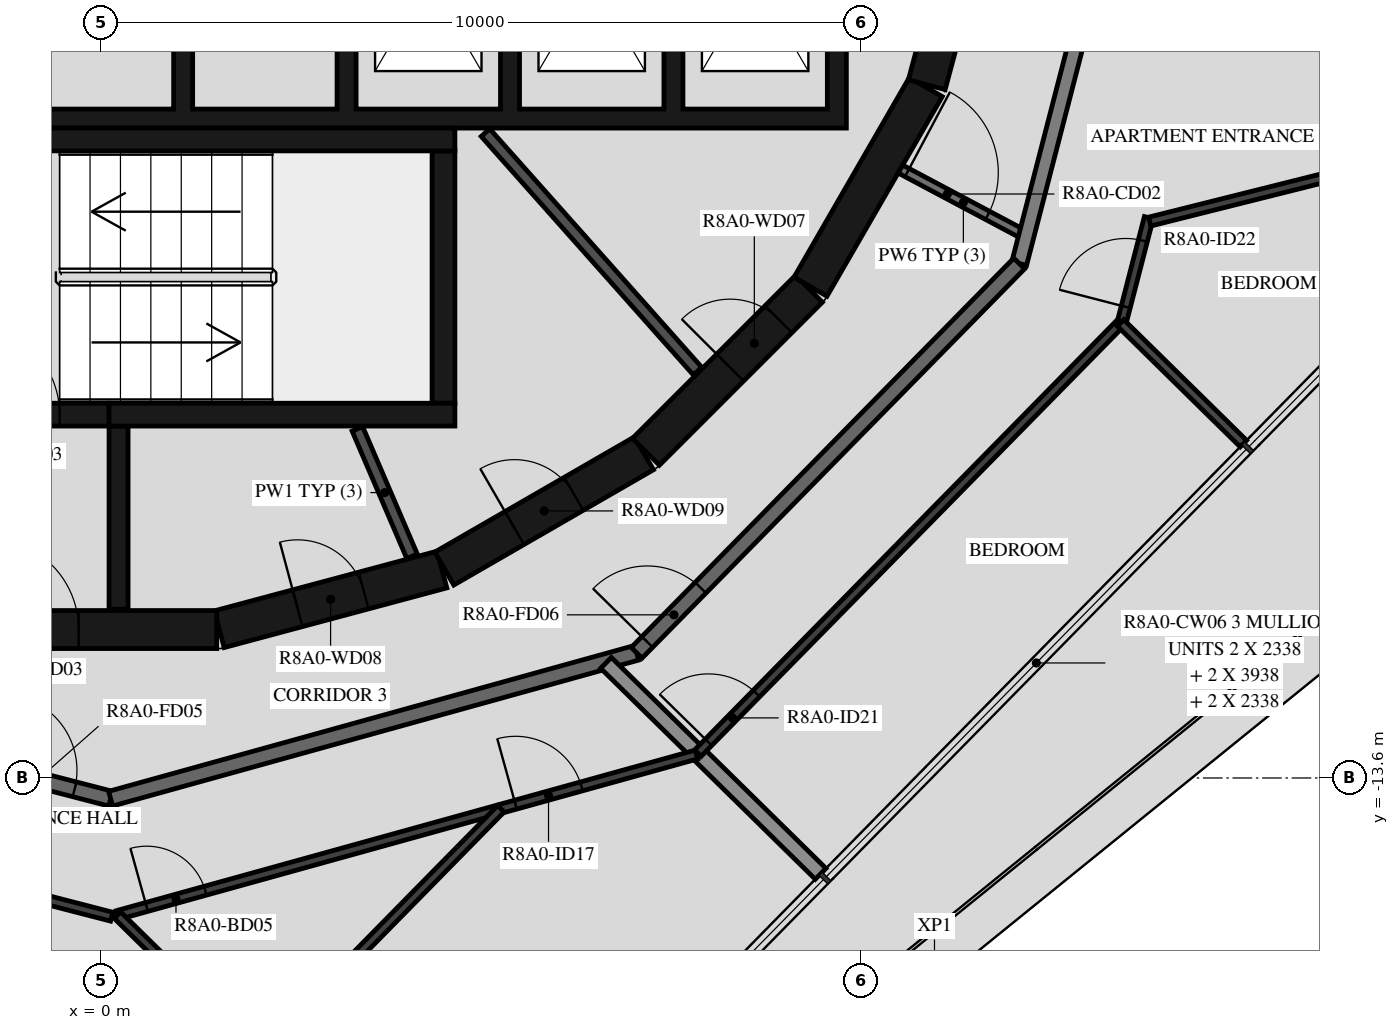
"""IFC4 building model, lengths in metres.
Left out: names, types, materials, properties, quantities, classifications, styles, units other than length and angle.
Written with IfcOpenShell. Run it as: python <this file> out.ifc"""

import sys

from ifc_helpers import new_model, si_unit, direction, frame, frame_2d, origin, place, context, subcontext, project, spatial, polyline, rectangle, outline, extrude, element, fill, save


model = new_model("IFC4")
c1 = context("Model", 3, precision=1e-05, world=origin(), true_north=direction((0.0, 1.0)))
c2 = subcontext(c1, "Body", "Model", "MODEL_VIEW")
j1 = project(units=[si_unit("LENGTHUNIT", "METRE"), si_unit("PLANEANGLEUNIT", "RADIAN")], contexts=[c1])
p1 = place(None, origin())
s1 = spatial("IfcSite", under=j1, at=p1, CompositionType="ELEMENT")
p2 = place(p1, origin())
s2 = spatial("IfcBuilding", under=s1, at=p2, CompositionType="ELEMENT")
p3 = place(p2, frame((0.0, 0.0, 298.2)))
s3 = spatial("IfcBuildingStorey", under=s2, at=p3, CompositionType="ELEMENT", Elevation=298.2)
p4 = place(p3, frame((1.55, -11.643, 0.0), z_axis=(0.0, 0.0, 1.0), x_axis=(0.965948410781, 0.258734743916, 0.0)))
e1 = element("IfcWall", 1, at=p4, inside=s3, PredefinedType="SHEAR", context=c2, shape_type="SweptSolid", body=[
    extrude(rectangle(XDim=3.033, YDim=0.5, at=frame_2d((1.516, 0.0))), origin(), (0.0, 0.0, 1.0), 3.12),
])
p5 = place(p4, frame((1.066, 0.0, 0.0)))
e2 = element("IfcOpeningElement", 2, at=p5, cuts=e1, PredefinedType="OPENING", context=c2, shape_type="SweptSolid", body=[
    extrude(rectangle(XDim=0.9, YDim=2.1, at=frame_2d((0.45, 1.05))), frame((0.0, 0.26, 0.0), z_axis=(0.0, -1.0, 0.0), x_axis=(1.0, 0.0, 0.0)), (0.0, 0.0, 1.0), 0.52),
])
p6 = place(p3, frame((4.51, -10.845, 0.0), z_axis=(0.0, 0.0, 1.0), x_axis=(0.865975092491, 0.500087131594, 0.0)))
e3 = element("IfcWall", 3, at=p6, inside=s3, PredefinedType="SHEAR", context=c2, shape_type="SweptSolid", body=[
    extrude(rectangle(XDim=3.033, YDim=0.5, at=frame_2d((1.516, 0.0))), origin(), (0.0, 0.0, 1.0), 3.12),
])
p7 = place(p6, frame((1.066, 0.0, 0.0)))
e4 = element("IfcOpeningElement", 4, at=p7, cuts=e3, PredefinedType="OPENING", context=c2, shape_type="SweptSolid", body=[
    extrude(rectangle(XDim=0.9, YDim=2.1, at=frame_2d((0.45, 1.05))), frame((0.0, 0.26, 0.0), z_axis=(0.0, -1.0, 0.0), x_axis=(1.0, 0.0, 0.0)), (0.0, 0.0, 1.0), 0.52),
])
p8 = place(p3, frame((7.164, -9.308, 0.0), z_axis=(0.0, 0.0, 1.0), x_axis=(0.707106781187, 0.707106781187, 0.0)))
e5 = element("IfcWall", 5, at=p8, inside=s3, PredefinedType="SHEAR", context=c2, shape_type="SweptSolid", body=[
    extrude(rectangle(XDim=3.032, YDim=0.5, at=frame_2d((1.516, 0.0))), origin(), (0.0, 0.0, 1.0), 3.12),
])
p9 = place(p8, frame((1.566, 0.0, 0.0)))
e6 = element("IfcOpeningElement", 6, at=p9, cuts=e5, PredefinedType="OPENING", context=c2, shape_type="SweptSolid", body=[
    extrude(rectangle(XDim=0.9, YDim=2.1, at=frame_2d((0.45, 1.05))), frame((0.0, 0.26, 0.0), z_axis=(0.0, -1.0, 0.0), x_axis=(1.0, 0.0, 0.0)), (0.0, 0.0, 1.0), 0.52),
])
for number, where, z_axis, x_axis in (
    (7, (9.329, -7.137, 0.0), (0.0, 0.0, 1.0), (0.5, 0.866, 0.0)),
    (8, (10.858, -4.479, 0.0), (0.0, 0.0, 1.0), (0.259, 0.966, 0.0)),
):
    element("IfcWall", number, at=place(p3, frame(where, z_axis=z_axis, x_axis=x_axis)), inside=s3, PredefinedType="SHEAR", context=c2, shape_type="SweptSolid", body=[
        extrude(rectangle(XDim=3.033, YDim=0.5, at=frame_2d((1.516, 0.0))), origin(), (0.0, 0.0, 1.0), 3.12),
    ])
p10 = place(p3, frame((-1.516, -11.647, 0.0), z_axis=(0.0, 0.0, 1.0), x_axis=(1.0, 0.0, 0.0)))
e9 = element("IfcWall", 9, at=p10, inside=s3, PredefinedType="SHEAR", context=c2, shape_type="SweptSolid", body=[
    extrude(rectangle(XDim=3.033, YDim=0.5, at=frame_2d((1.516, 0.0))), origin(), (0.0, 0.0, 1.0), 3.12),
])
p11 = place(p10, frame((0.016, 0.0, 0.0)))
e10 = element("IfcOpeningElement", 10, at=p11, cuts=e9, PredefinedType="OPENING", context=c2, shape_type="SweptSolid", body=[
    extrude(rectangle(XDim=1.2, YDim=2.1, at=frame_2d((0.6, 1.05))), frame((0.0, 0.26, 0.0), z_axis=(0.0, -1.0, 0.0), x_axis=(1.0, 0.0, 0.0)), (0.0, 0.0, 1.0), 0.52),
])
p12 = place(p3, frame((-2.4, -5.2, 0.0), z_axis=(0.0, 0.0, 1.0), x_axis=(1.0, 0.0, 0.0)))
e11 = element("IfcWall", 11, at=p12, inside=s3, PredefinedType="SHEAR", context=c2, shape_type="SweptSolid", body=[
    extrude(rectangle(XDim=7.05, YDim=0.3, at=frame_2d((3.525, 0.0))), origin(), (0.0, 0.0, 1.0), 3.12),
])
p13 = place(p3, frame((4.5, -8.67, 0.0), z_axis=(0.0, 0.0, 1.0), x_axis=(0.0, 1.0, 0.0)))
e12 = element("IfcWall", 12, at=p13, inside=s3, PredefinedType="SHEAR", context=c2, shape_type="SweptSolid", body=[
    extrude(rectangle(XDim=3.32, YDim=0.3, at=frame_2d((1.66, 0.0))), origin(), (0.0, 0.0, 1.0), 3.12),
])
p14 = place(p3, frame((0.1, -8.82, 0.0), z_axis=(0.0, 0.0, 1.0), x_axis=(1.0, 0.0, 0.0)))
e13 = element("IfcWall", 13, at=p14, inside=s3, PredefinedType="SHEAR", context=c2, shape_type="SweptSolid", body=[
    extrude(rectangle(XDim=4.55, YDim=0.3, at=frame_2d((2.275, 0.0))), origin(), (0.0, 0.0, 1.0), 3.12),
])
p15 = place(p3, frame((-2.4, -8.82, 0.0), z_axis=(0.0, 0.0, 1.0), x_axis=(1.0, 0.0, 0.0)))
e14 = element("IfcWall", 14, at=p15, inside=s3, PredefinedType="SHEAR", context=c2, shape_type="SweptSolid", body=[
    extrude(rectangle(XDim=2.5, YDim=0.3, at=frame_2d((1.25, 0.0))), origin(), (0.0, 0.0, 1.0), 3.12),
])
p16 = place(p15, frame((0.65, 0.0, 0.0)))
e15 = element("IfcOpeningElement", 15, at=p16, cuts=e14, PredefinedType="OPENING", context=c2, shape_type="SweptSolid", body=[
    extrude(rectangle(XDim=1.2, YDim=2.1, at=frame_2d((0.6, 1.05))), frame((0.0, 0.16, 0.0), z_axis=(0.0, -1.0, 0.0), x_axis=(1.0, 0.0, 0.0)), (0.0, 0.0, 1.0), 0.32),
])
p17 = place(p3, frame((0.225, -8.97, 0.0), z_axis=(0.0, 0.0, 1.0), x_axis=(0.0, -1.0, 0.0)))
e16 = element("IfcWall", 16, at=p17, inside=s3, PredefinedType="SHEAR", context=c2, shape_type="SweptSolid", body=[
    extrude(rectangle(XDim=2.41, YDim=0.25, at=frame_2d((1.205, 0.0))), origin(), (0.0, 0.0, 1.0), 3.12),
])
p18 = place(p3, origin())
e17 = element("IfcWall", 17, at=p18, inside=s3, PredefinedType="SHEAR", context=c2, shape_type="SweptSolid", body=[
    extrude(outline(polyline([(9.8, -5.05), (9.8, -4.8), (9.8, -1.9), (9.55, -1.9), (9.55, -4.8), (7.65, -4.8), (7.65, -1.9), (7.4, -1.9), (7.4, -4.8), (5.5, -4.8), (5.5, -1.9), (5.25, -1.9), (5.25, -4.8), (3.35, -4.8), (3.35, -1.9), (3.1, -1.9), (3.1, -4.8), (1.2, -4.8), (1.2, -1.9), (0.95, -1.9), (0.95, -4.8), (-0.95, -4.8), (-0.95, -1.9), (-1.2, -1.9), (-1.2, -4.8), (-3.1, -4.8), (-3.1, -1.9), (-3.35, -1.9), (-3.35, -4.8), (-5.25, -4.8), (-5.25, -1.9), (-5.5, -1.9), (-5.5, -4.8), (-9.55, -4.8), (-9.55, -1.9), (-9.8, -1.9), (-9.8, -4.8), (-9.8, -5.05), (9.8, -5.05)])), origin(), (0.0, 0.0, 1.0), 3.12),
])
p19 = place(p3, frame((7.842, -8.248, 0.0), z_axis=(0.0, 0.0, 1.0), x_axis=(-0.66446128181, 0.747322691329, 0.0)))
e18 = element("IfcWall", 18, at=p19, inside=s3, PredefinedType="PARTITIONING", context=c2, shape_type="SweptSolid", body=[
    extrude(rectangle(XDim=4.198, YDim=0.15, at=frame_2d((2.099, 0.0))), origin(), (0.0, 0.0, 1.0), 3.12),
])
p20 = place(p3, frame((3.367, -9.007, 0.0), z_axis=(0.0, 0.0, 1.0), x_axis=(0.394387482265, -0.918944238696, 0.0)))
e19 = element("IfcWall", 19, at=p20, inside=s3, PredefinedType="PARTITIONING", context=c2, shape_type="SweptSolid", body=[
    extrude(rectangle(XDim=1.825, YDim=0.15, at=frame_2d((0.913, 0.0))), origin(), (0.0, 0.0, 1.0), 3.12),
])
p21 = place(p3, frame((10.511, -5.589, 0.0), z_axis=(0.0, 0.0, 1.0), x_axis=(0.882957311919, -0.469453283437, 0.0)))
e20 = element("IfcWall", 20, at=p21, inside=s3, PredefinedType="PARTITIONING", context=c2, shape_type="SweptSolid", body=[
    extrude(rectangle(XDim=1.876, YDim=0.12, at=frame_2d((0.938, 0.0))), origin(), (0.0, 0.0, 1.0), 3.12),
])
p22 = place(p21, frame((0.1, 0.0, 0.0)))
e21 = element("IfcOpeningElement", 21, at=p22, cuts=e20, PredefinedType="OPENING", context=c2, shape_type="SweptSolid", body=[
    extrude(rectangle(XDim=1.2, YDim=2.1, at=frame_2d((0.6, 1.05))), frame((0.0, 0.07, 0.0), z_axis=(0.0, -1.0, 0.0), x_axis=(1.0, 0.0, 0.0)), (0.0, 0.0, 1.0), 0.14),
])
p23 = place(p3, frame((12.074, -6.831, 0.0), z_axis=(0.0, 0.0, 1.0), x_axis=(0.250391063186, 0.968144780225, 0.0)))
e22 = element("IfcWall", 22, at=p23, inside=s3, PredefinedType="STANDARD", context=c2, shape_type="SweptSolid", body=[
    extrude(rectangle(XDim=7.181, YDim=0.2, at=frame_2d((3.591, 0.0))), origin(), (0.0, 0.0, 1.0), 3.12),
])
p24 = place(p23, frame((3.581, 0.0, 0.0)))
e23 = element("IfcOpeningElement", 23, at=p24, cuts=e22, PredefinedType="OPENING", context=c2, shape_type="SweptSolid", body=[
    extrude(rectangle(XDim=1.8, YDim=2.1, at=frame_2d((0.9, 1.05))), frame((0.0, 0.11, 0.0), z_axis=(0.0, -1.0, 0.0), x_axis=(1.0, 0.0, 0.0)), (0.0, 0.0, 1.0), 0.22),
])
p25 = place(p3, frame((-6.831, -12.074, 0.0), z_axis=(0.0, 0.0, 1.0), x_axis=(0.968144780225, -0.250391063186, 0.0)))
e24 = element("IfcWall", 24, at=p25, inside=s3, PredefinedType="STANDARD", context=c2, shape_type="SweptSolid", body=[
    extrude(rectangle(XDim=7.181, YDim=0.2, at=frame_2d((3.591, 0.0))), origin(), (0.0, 0.0, 1.0), 3.12),
])
p26 = place(p25, frame((2.39, 0.0, 0.0)))
e25 = element("IfcOpeningElement", 25, at=p26, cuts=e24, PredefinedType="OPENING", context=c2, shape_type="SweptSolid", body=[
    extrude(rectangle(XDim=1.0, YDim=2.1, at=frame_2d((0.5, 1.05))), frame((0.0, 0.11, 0.0), z_axis=(0.0, -1.0, 0.0), x_axis=(1.0, 0.0, 0.0)), (0.0, 0.0, 1.0), 0.22),
])
p27 = place(p25, frame((5.69, 0.0, 0.0)))
e26 = element("IfcOpeningElement", 26, at=p27, cuts=e24, PredefinedType="OPENING", context=c2, shape_type="SweptSolid", body=[
    extrude(rectangle(XDim=1.0, YDim=2.1, at=frame_2d((0.5, 1.05))), frame((0.0, 0.11, 0.0), z_axis=(0.0, -1.0, 0.0), x_axis=(1.0, 0.0, 0.0)), (0.0, 0.0, 1.0), 0.22),
])
p28 = place(p3, frame((0.121, -13.872, 0.0), z_axis=(0.0, 0.0, 1.0), x_axis=(0.963625960674, 0.267254575108, 0.0)))
e27 = element("IfcWall", 27, at=p28, inside=s3, PredefinedType="STANDARD", context=c2, shape_type="SweptSolid", body=[
    extrude(rectangle(XDim=7.181, YDim=0.2, at=frame_2d((3.591, 0.0))), origin(), (0.0, 0.0, 1.0), 3.12),
])
p29 = place(p3, frame((7.041, -11.953, 0.0), z_axis=(0.0, 0.0, 1.0), x_axis=(0.70090916255, 0.713250549143, 0.0)))
e28 = element("IfcWall", 28, at=p29, inside=s3, PredefinedType="STANDARD", context=c2, shape_type="SweptSolid", body=[
    extrude(rectangle(XDim=7.181, YDim=0.2, at=frame_2d((3.59, 0.0))), origin(), (0.0, 0.0, 1.0), 3.12),
])
p30 = place(p29, frame((0.2, 0.0, 0.0)))
e29 = element("IfcOpeningElement", 29, at=p30, cuts=e28, PredefinedType="OPENING", context=c2, shape_type="SweptSolid", body=[
    extrude(rectangle(XDim=1.0, YDim=2.1, at=frame_2d((0.5, 1.05))), frame((0.0, 0.11, 0.0), z_axis=(0.0, -1.0, 0.0), x_axis=(1.0, 0.0, 0.0)), (0.0, 0.0, 1.0), 0.22),
])
p31 = place(p3, frame((9.462, -14.861, 0.0), z_axis=(0.0, 0.0, 1.0), x_axis=(-0.713276937124, 0.700882308927, 0.0)))
e30 = element("IfcWall", 30, at=p31, inside=s3, PredefinedType="STANDARD", context=c2, shape_type="SweptSolid", body=[
    extrude(rectangle(XDim=3.959, YDim=0.2, at=frame_2d((1.979, 0.0))), origin(), (0.0, 0.0, 1.0), 2.73),
])
p32 = place(p3, frame((-2.427, -14.763, 0.0), z_axis=(0.0, 0.0, 1.0), x_axis=(0.968151154118, -0.250366417036, 0.0)))
e31 = element("IfcWall", 31, at=p32, inside=s3, PredefinedType="PARTITIONING", context=c2, shape_type="SweptSolid", body=[
    extrude(rectangle(XDim=2.646, YDim=0.12, at=frame_2d((1.323, 0.0))), origin(), (0.0, 0.0, 1.0), 3.12),
])
p33 = place(p3, frame((0.21, -15.404, 0.0), z_axis=(0.0, 0.0, 1.0), x_axis=(0.963630625717, 0.267237754032, 0.0)))
e32 = element("IfcWall", 32, at=p33, inside=s3, PredefinedType="PARTITIONING", context=c2, shape_type="SweptSolid", body=[
    extrude(rectangle(XDim=7.907, YDim=0.12, at=frame_2d((3.954, 0.0))), origin(), (0.0, 0.0, 1.0), 3.12),
])
p34 = place(p33, frame((0.4, 0.0, 0.0)))
e33 = element("IfcOpeningElement", 33, at=p34, cuts=e32, PredefinedType="OPENING", context=c2, shape_type="SweptSolid", body=[
    extrude(rectangle(XDim=0.8, YDim=2.1, at=frame_2d((0.4, 1.05))), frame((0.0, 0.07, 0.0), z_axis=(0.0, -1.0, 0.0), x_axis=(1.0, 0.0, 0.0)), (0.0, 0.0, 1.0), 0.14),
])
p35 = place(p33, frame((5.436, 0.0, 0.0)))
e34 = element("IfcOpeningElement", 34, at=p35, cuts=e32, PredefinedType="OPENING", context=c2, shape_type="SweptSolid", body=[
    extrude(rectangle(XDim=0.9, YDim=2.1, at=frame_2d((0.45, 1.05))), frame((0.0, 0.07, 0.0), z_axis=(0.0, -1.0, 0.0), x_axis=(1.0, 0.0, 0.0)), (0.0, 0.0, 1.0), 0.14),
])
p36 = place(p3, frame((-1.304, -20.68, 0.0), z_axis=(0.0, 0.0, 1.0), x_axis=(0.700896976526, 0.713262524108, 0.0)))
e35 = element("IfcWall", 35, at=p36, inside=s3, PredefinedType="PARTITIONING", context=c2, shape_type="SweptSolid", body=[
    extrude(rectangle(XDim=9.358, YDim=0.12, at=frame_2d((4.679, 0.0))), origin(), (0.0, 0.0, 1.0), 3.12),
])
p37 = place(p36, frame((0.849, 0.0, 0.0)))
e36 = element("IfcOpeningElement", 36, at=p37, cuts=e35, PredefinedType="OPENING", context=c2, shape_type="SweptSolid", body=[
    extrude(rectangle(XDim=0.9, YDim=2.1, at=frame_2d((0.45, 1.05))), frame((0.0, 0.07, 0.0), z_axis=(0.0, -1.0, 0.0), x_axis=(1.0, 0.0, 0.0)), (0.0, 0.0, 1.0), 0.14),
])
p38 = place(p3, frame((2.077, -17.239, 0.0), z_axis=(0.0, 0.0, 1.0), x_axis=(-0.713235001716, 0.700924983381, 0.0)))
e37 = element("IfcWall", 37, at=p38, inside=s3, PredefinedType="PARTITIONING", context=c2, shape_type="SweptSolid", body=[
    extrude(rectangle(XDim=2.618, YDim=0.12, at=frame_2d((1.309, 0.0))), origin(), (0.0, 0.0, 1.0), 3.12),
])
p39 = place(p3, frame((7.846, -13.273, 0.0), z_axis=(0.0, 0.0, 1.0), x_axis=(0.700911018066, 0.713248725728, 0.0)))
e38 = element("IfcWall", 38, at=p39, inside=s3, PredefinedType="PARTITIONING", context=c2, shape_type="SweptSolid", body=[
    extrude(rectangle(XDim=7.935, YDim=0.12, at=frame_2d((3.968, 0.0))), origin(), (0.0, 0.0, 1.0), 3.12),
])
p40 = place(p39, frame((0.2, 0.0, 0.0)))
e39 = element("IfcOpeningElement", 39, at=p40, cuts=e38, PredefinedType="OPENING", context=c2, shape_type="SweptSolid", body=[
    extrude(rectangle(XDim=0.9, YDim=2.1, at=frame_2d((0.45, 1.05))), frame((0.0, 0.07, 0.0), z_axis=(0.0, -1.0, 0.0), x_axis=(1.0, 0.0, 0.0)), (0.0, 0.0, 1.0), 0.14),
])
p41 = place(p3, frame((13.426, -7.596, 0.0), z_axis=(0.0, 0.0, 1.0), x_axis=(0.250380027586, 0.968147634292, 0.0)))
e40 = element("IfcWall", 40, at=p41, inside=s3, PredefinedType="PARTITIONING", context=c2, shape_type="SweptSolid", body=[
    extrude(rectangle(XDim=1.412, YDim=0.12, at=frame_2d((0.706, 0.0))), origin(), (0.0, 0.0, 1.0), 3.12),
])
p42 = place(p41, frame((0.2, 0.0, 0.0)))
e41 = element("IfcOpeningElement", 41, at=p42, cuts=e40, PredefinedType="OPENING", context=c2, shape_type="SweptSolid", body=[
    extrude(rectangle(XDim=0.9, YDim=2.1, at=frame_2d((0.45, 1.05))), frame((0.0, 0.07, 0.0), z_axis=(0.0, -1.0, 0.0), x_axis=(1.0, 0.0, 0.0)), (0.0, 0.0, 1.0), 0.14),
])
p43 = place(p3, frame((13.792, -6.28, 0.0), z_axis=(0.0, 0.0, 1.0), x_axis=(0.970009253073, 0.243067992449, 0.0)))
e42 = element("IfcWall", 42, at=p43, inside=s3, PredefinedType="PARTITIONING", context=c2, shape_type="SweptSolid", body=[
    extrude(rectangle(XDim=5.611, YDim=0.12, at=frame_2d((2.805, 0.0))), origin(), (0.0, 0.0, 1.0), 3.12),
])
p44 = place(p3, frame((15.024, -9.201, 0.0), z_axis=(0.0, 0.0, 1.0), x_axis=(-0.713331704042, 0.700826569137, 0.0)))
e43 = element("IfcWall", 43, at=p44, inside=s3, PredefinedType="PARTITIONING", context=c2, shape_type="SweptSolid", body=[
    extrude(rectangle(XDim=2.265, YDim=0.12, at=frame_2d((1.132, 0.0))), origin(), (0.0, 0.0, 1.0), 2.73),
])
p45 = place(p16, origin())
e44 = element("IfcDoor", 44, at=p45, inside=s3, OperationType="SINGLE_SWING_LEFT", PredefinedType="DOOR", context=c2, shape_type="SweptSolid", body=[
    extrude(rectangle(XDim=1.2, YDim=2.1, at=frame_2d((0.6, 1.05))), frame((0.0, 0.025, 0.0), z_axis=(0.0, -1.0, 0.0), x_axis=(1.0, 0.0, 0.0)), (0.0, 0.0, 1.0), 0.05),
])
fill(e15, e44)
p46 = place(p11, origin())
e45 = element("IfcDoor", 45, at=p46, inside=s3, OperationType="SINGLE_SWING_RIGHT", PredefinedType="DOOR", context=c2, shape_type="SweptSolid", body=[
    extrude(rectangle(XDim=1.2, YDim=2.1, at=frame_2d((0.6, 1.05))), frame((0.0, 0.025, 0.0), z_axis=(0.0, -1.0, 0.0), x_axis=(1.0, 0.0, 0.0)), (0.0, 0.0, 1.0), 0.05),
])
fill(e10, e45)
p47 = place(p9, origin())
e46 = element("IfcDoor", 46, at=p47, inside=s3, OperationType="SINGLE_SWING_LEFT", PredefinedType="DOOR", context=c2, shape_type="SweptSolid", body=[
    extrude(rectangle(XDim=0.9, YDim=2.1, at=frame_2d((0.45, 1.05))), frame((0.0, 0.025, 0.0), z_axis=(0.0, -1.0, 0.0), x_axis=(1.0, 0.0, 0.0)), (0.0, 0.0, 1.0), 0.05),
])
fill(e6, e46)
p48 = place(p5, origin())
e47 = element("IfcDoor", 47, at=p48, inside=s3, OperationType="SINGLE_SWING_RIGHT", PredefinedType="DOOR", context=c2, shape_type="SweptSolid", body=[
    extrude(rectangle(XDim=0.9, YDim=2.1, at=frame_2d((0.45, 1.05))), frame((0.0, 0.025, 0.0), z_axis=(0.0, -1.0, 0.0), x_axis=(1.0, 0.0, 0.0)), (0.0, 0.0, 1.0), 0.05),
])
fill(e2, e47)
p49 = place(p7, origin())
e48 = element("IfcDoor", 48, at=p49, inside=s3, OperationType="SINGLE_SWING_LEFT", PredefinedType="DOOR", context=c2, shape_type="SweptSolid", body=[
    extrude(rectangle(XDim=0.9, YDim=2.1, at=frame_2d((0.45, 1.05))), frame((0.0, 0.025, 0.0), z_axis=(0.0, -1.0, 0.0), x_axis=(1.0, 0.0, 0.0)), (0.0, 0.0, 1.0), 0.05),
])
fill(e4, e48)
p50 = place(p27, origin())
e49 = element("IfcDoor", 49, at=p50, inside=s3, OperationType="SINGLE_SWING_LEFT", PredefinedType="DOOR", context=c2, shape_type="SweptSolid", body=[
    extrude(rectangle(XDim=1.0, YDim=2.1, at=frame_2d((0.5, 1.05))), frame((0.0, 0.025, 0.0), z_axis=(0.0, -1.0, 0.0), x_axis=(1.0, 0.0, 0.0)), (0.0, 0.0, 1.0), 0.05),
])
fill(e26, e49)
p51 = place(p34, origin())
e50 = element("IfcDoor", 50, at=p51, inside=s3, OperationType="SINGLE_SWING_LEFT", PredefinedType="DOOR", context=c2, shape_type="SweptSolid", body=[
    extrude(rectangle(XDim=0.8, YDim=2.1, at=frame_2d((0.4, 1.05))), frame((0.0, 0.025, 0.0), z_axis=(0.0, -1.0, 0.0), x_axis=(1.0, 0.0, 0.0)), (0.0, 0.0, 1.0), 0.05),
])
fill(e33, e50)
p52 = place(p35, origin())
e51 = element("IfcDoor", 51, at=p52, inside=s3, OperationType="SINGLE_SWING_LEFT", PredefinedType="DOOR", context=c2, shape_type="SweptSolid", body=[
    extrude(rectangle(XDim=0.9, YDim=2.1, at=frame_2d((0.45, 1.05))), frame((0.0, 0.025, 0.0), z_axis=(0.0, -1.0, 0.0), x_axis=(1.0, 0.0, 0.0)), (0.0, 0.0, 1.0), 0.05),
])
fill(e34, e51)
p53 = place(p30, origin())
e52 = element("IfcDoor", 52, at=p53, inside=s3, OperationType="SINGLE_SWING_LEFT", PredefinedType="DOOR", context=c2, shape_type="SweptSolid", body=[
    extrude(rectangle(XDim=1.0, YDim=2.1, at=frame_2d((0.5, 1.05))), frame((0.0, 0.025, 0.0), z_axis=(0.0, -1.0, 0.0), x_axis=(1.0, 0.0, 0.0)), (0.0, 0.0, 1.0), 0.05),
])
fill(e29, e52)
p54 = place(p40, origin())
e53 = element("IfcDoor", 53, at=p54, inside=s3, OperationType="SINGLE_SWING_LEFT", PredefinedType="DOOR", context=c2, shape_type="SweptSolid", body=[
    extrude(rectangle(XDim=0.9, YDim=2.1, at=frame_2d((0.45, 1.05))), frame((0.0, 0.025, 0.0), z_axis=(0.0, -1.0, 0.0), x_axis=(1.0, 0.0, 0.0)), (0.0, 0.0, 1.0), 0.05),
])
fill(e39, e53)
p55 = place(p42, origin())
e54 = element("IfcDoor", 54, at=p55, inside=s3, OperationType="SINGLE_SWING_RIGHT", PredefinedType="DOOR", context=c2, shape_type="SweptSolid", body=[
    extrude(rectangle(XDim=0.9, YDim=2.1, at=frame_2d((0.45, 1.05))), frame((0.0, 0.025, 0.0), z_axis=(0.0, -1.0, 0.0), x_axis=(1.0, 0.0, 0.0)), (0.0, 0.0, 1.0), 0.05),
])
fill(e41, e54)
p56 = place(p22, origin())
e55 = element("IfcDoor", 55, at=p56, inside=s3, OperationType="DOUBLE_DOOR_SINGLE_SWING", PredefinedType="DOOR", context=c2, shape_type="SweptSolid", body=[
    extrude(rectangle(XDim=1.2, YDim=2.1, at=frame_2d((0.6, 1.05))), frame((0.0, 0.025, 0.0), z_axis=(0.0, -1.0, 0.0), x_axis=(1.0, 0.0, 0.0)), (0.0, 0.0, 1.0), 0.05),
])
fill(e21, e55)
save(model, sys.argv[1])
